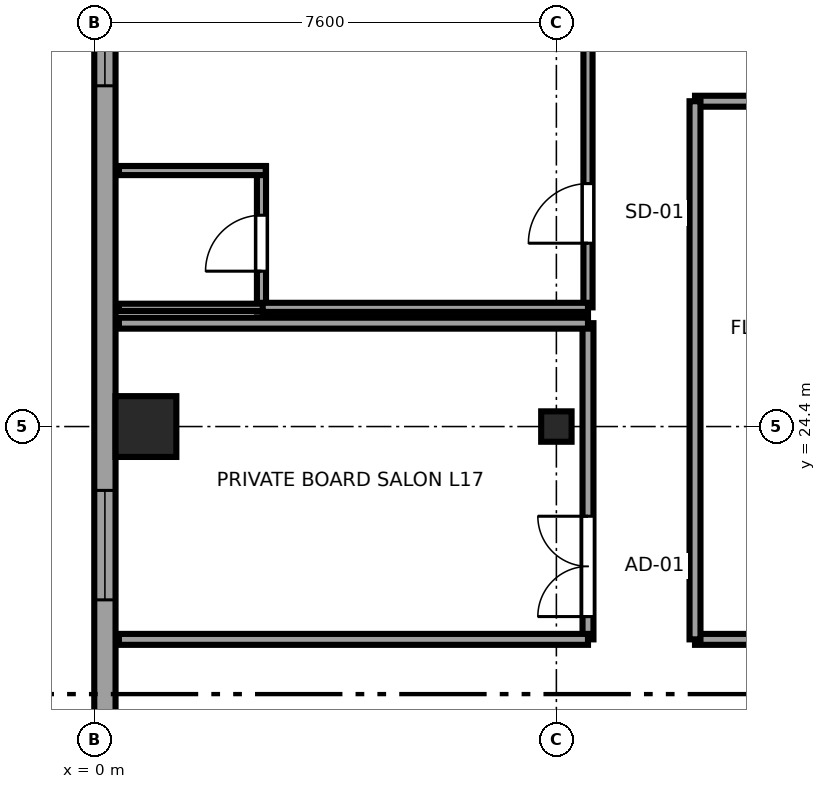
"""IFC4 building model, lengths in metres.
Left out: names, types, materials, properties, quantities, classifications, styles, units other than length and angle.
Written with IfcOpenShell. Run it as: python <this file> out.ifc"""

import sys

from ifc_helpers import new_model, si_unit, direction, frame, frame_2d, origin, origin_2d, place, context, subcontext, project, spatial, rectangle, i_section, extrude, source, transform, mapped, element, fill, save


model = new_model("IFC4")
c1 = context("Model", 3, precision=1e-05, world=origin(), true_north=direction((0.0, 1.0)))
c2 = subcontext(c1, "Body", "Model", "MODEL_VIEW")
j1 = project(units=[si_unit("LENGTHUNIT", "METRE"), si_unit("PLANEANGLEUNIT", "RADIAN")], contexts=[c1])
p1 = place(None, origin())
s1 = spatial("IfcSite", under=j1, at=p1, CompositionType="ELEMENT")
p2 = place(p1, origin())
s2 = spatial("IfcBuilding", under=s1, at=p2, CompositionType="ELEMENT")
p3 = place(p2, frame((0.0, 0.0, 71.05)))
s3 = spatial("IfcBuildingStorey", under=s2, at=p3, CompositionType="ELEMENT", Elevation=71.05)
m1 = source(origin(), c2, "Body", "SweptSolid", [
    extrude(rectangle(XDim=1.0, YDim=1.0, at=origin_2d()), origin(), (0.0, 0.0, 1.0), 3.55),
])
p4 = place(p3, frame((0.85, 24.4, 0.0), z_axis=(0.0, 0.0, 1.0), x_axis=(1.0, 0.0, 0.0)))
e1 = element("IfcColumn", 1, at=p4, inside=s3, PredefinedType="COLUMN", context=c2, shape_type="MappedRepresentation", body=[
    mapped(m1, transform((0.0, 0.0, 0.0), x_axis=(1.0, 0.0, 0.0), y_axis=(0.0, 1.0, 0.0), z_axis=(0.0, 0.0, 1.0), scale=1.0)),
])
m2 = source(origin(), c2, "Body", "SweptSolid", [
    extrude(i_section(OverallWidth=0.5, OverallDepth=0.5, WebThickness=0.028, FlangeThickness=0.045, at=origin_2d()), origin(), (0.0, 0.0, 1.0), 3.55),
])
p5 = place(p3, frame((7.6, 24.4, 0.0), z_axis=(0.0, 0.0, 1.0), x_axis=(1.0, 0.0, 0.0)))
e2 = element("IfcColumn", 2, at=p5, inside=s3, PredefinedType="COLUMN", context=c2, shape_type="MappedRepresentation", body=[
    mapped(m2, transform((0.0, 0.0, 0.0), x_axis=(1.0, 0.0, 0.0), y_axis=(0.0, 1.0, 0.0), z_axis=(0.0, 0.0, 1.0), scale=1.0)),
])
p6 = place(p3, frame((0.175, 41.383, 0.0), z_axis=(0.0, 0.0, 1.0), x_axis=(0.0, -1.0, 0.0)))
e3 = element("IfcWall", 3, at=p6, inside=s3, PredefinedType="SOLIDWALL", context=c2, shape_type="SweptSolid", body=[
    extrude(rectangle(XDim=36.766, YDim=0.35, at=frame_2d((18.383, 0.0))), origin(), (0.0, 0.0, 1.0), 3.37),
])
p7 = place(p6, frame((1.676, 0.0, 0.68)))
e4 = element("IfcOpeningElement", 4, at=p7, cuts=e3, PredefinedType="OPENING", context=c2, shape_type="SweptSolid", body=[
    extrude(rectangle(XDim=1.8, YDim=1.85, at=frame_2d((0.9, 0.925))), frame((0.0, 0.185, 0.0), z_axis=(0.0, -1.0, 0.0), x_axis=(1.0, 0.0, 0.0)), (0.0, 0.0, 1.0), 0.37),
])
p8 = place(p6, frame((4.578, 0.0, 0.68)))
e5 = element("IfcOpeningElement", 5, at=p8, cuts=e3, PredefinedType="OPENING", context=c2, shape_type="SweptSolid", body=[
    extrude(rectangle(XDim=1.8, YDim=1.85, at=frame_2d((0.9, 0.925))), frame((0.0, 0.185, 0.0), z_axis=(0.0, -1.0, 0.0), x_axis=(1.0, 0.0, 0.0)), (0.0, 0.0, 1.0), 0.37),
])
p9 = place(p6, frame((9.579, 0.0, 0.68)))
e6 = element("IfcOpeningElement", 6, at=p9, cuts=e3, PredefinedType="OPENING", context=c2, shape_type="SweptSolid", body=[
    extrude(rectangle(XDim=1.8, YDim=1.85, at=frame_2d((0.9, 0.925))), frame((0.0, 0.185, 0.0), z_axis=(0.0, -1.0, 0.0), x_axis=(1.0, 0.0, 0.0)), (0.0, 0.0, 1.0), 0.37),
])
p10 = place(p6, frame((18.033, 0.0, 0.68)))
e7 = element("IfcOpeningElement", 7, at=p10, cuts=e3, PredefinedType="OPENING", context=c2, shape_type="SweptSolid", body=[
    extrude(rectangle(XDim=1.8, YDim=1.85, at=frame_2d((0.9, 0.925))), frame((0.0, 0.185, 0.0), z_axis=(0.0, -1.0, 0.0), x_axis=(1.0, 0.0, 0.0)), (0.0, 0.0, 1.0), 0.37),
])
p11 = place(p6, frame((26.436, 0.0, 0.68)))
e8 = element("IfcOpeningElement", 8, at=p11, cuts=e3, PredefinedType="OPENING", context=c2, shape_type="SweptSolid", body=[
    extrude(rectangle(XDim=1.8, YDim=1.85, at=frame_2d((0.9, 0.925))), frame((0.0, 0.185, 0.0), z_axis=(0.0, -1.0, 0.0), x_axis=(1.0, 0.0, 0.0)), (0.0, 0.0, 1.0), 0.37),
])
p12 = place(p6, frame((29.338, 0.0, 0.68)))
e9 = element("IfcOpeningElement", 9, at=p12, cuts=e3, PredefinedType="OPENING", context=c2, shape_type="SweptSolid", body=[
    extrude(rectangle(XDim=1.8, YDim=1.85, at=frame_2d((0.9, 0.925))), frame((0.0, 0.185, 0.0), z_axis=(0.0, -1.0, 0.0), x_axis=(1.0, 0.0, 0.0)), (0.0, 0.0, 1.0), 0.37),
])
p13 = place(p6, frame((34.34, 0.0, 0.68)))
e10 = element("IfcOpeningElement", 10, at=p13, cuts=e3, PredefinedType="OPENING", context=c2, shape_type="SweptSolid", body=[
    extrude(rectangle(XDim=1.8, YDim=1.85, at=frame_2d((0.9, 0.925))), frame((0.0, 0.185, 0.0), z_axis=(0.0, -1.0, 0.0), x_axis=(1.0, 0.0, 0.0)), (0.0, 0.0, 1.0), 0.37),
])
p14 = place(p3, frame((2.75, 26.29, 0.0), z_axis=(0.0, 0.0, 1.0), x_axis=(0.0, 1.0, 0.0)))
e11 = element("IfcWall", 11, at=p14, inside=s3, PredefinedType="PARTITIONING", context=c2, shape_type="SweptSolid", body=[
    extrude(rectangle(XDim=2.39, YDim=0.15, at=frame_2d((1.195, 0.0))), origin(), (0.0, 0.0, 1.0), 3.37),
])
p15 = place(p14, frame((0.665, 0.0, 0.0)))
e12 = element("IfcOpeningElement", 12, at=p15, cuts=e11, PredefinedType="OPENING", context=c2, shape_type="SweptSolid", body=[
    extrude(rectangle(XDim=0.92, YDim=2.01, at=frame_2d((0.46, 1.005))), frame((0.0, 0.085, 0.0), z_axis=(0.0, -1.0, 0.0), x_axis=(1.0, 0.0, 0.0)), (0.0, 0.0, 1.0), 0.17),
])
p16 = place(p3, frame((0.405, 26.36, 0.0), z_axis=(0.0, 0.0, 1.0), x_axis=(1.0, 0.0, 0.0)))
e13 = element("IfcWall", 13, at=p16, inside=s3, PredefinedType="PLUMBINGWALL", context=c2, shape_type="SweptSolid", body=[
    extrude(rectangle(XDim=2.415, YDim=0.12, at=frame_2d((1.208, 0.0))), origin(), (0.0, 0.0, 1.0), 3.37),
])
p17 = place(p3, frame((0.405, 28.61, 0.0), z_axis=(0.0, 0.0, 1.0), x_axis=(1.0, 0.0, 0.0)))
e14 = element("IfcWall", 14, at=p17, inside=s3, PredefinedType="PARTITIONING", context=c2, shape_type="SweptSolid", body=[
    extrude(rectangle(XDim=2.415, YDim=0.15, at=frame_2d((1.208, 0.0))), origin(), (0.0, 0.0, 1.0), 3.37),
])
p18 = place(p3, frame((8.12, 20.9, 0.0), z_axis=(0.0, 0.0, 1.0), x_axis=(0.0, 1.0, 0.0)))
e15 = element("IfcWall", 15, at=p18, inside=s3, PredefinedType="PARTITIONING", context=c2, shape_type="SweptSolid", body=[
    extrude(rectangle(XDim=5.2, YDim=0.18, at=frame_2d((2.6, 0.0))), origin(), (0.0, 0.0, 1.0), 3.37),
])
p19 = place(p18, frame((0.375, 0.0, 0.0)))
e16 = element("IfcOpeningElement", 16, at=p19, cuts=e15, PredefinedType="OPENING", context=c2, shape_type="SweptSolid", body=[
    extrude(rectangle(XDim=1.65, YDim=2.15, at=frame_2d((0.825, 1.075))), frame((0.0, 0.1, 0.0), z_axis=(0.0, -1.0, 0.0), x_axis=(1.0, 0.0, 0.0)), (0.0, 0.0, 1.0), 0.2),
])
for number, where, z_axis, x_axis in (
    (17, (0.405, 20.9, 0.0), (0.0, 0.0, 1.0), (1.0, 0.0, 0.0)),
    (18, (0.405, 26.1, 0.0), (0.0, 0.0, 1.0), (1.0, 0.0, 0.0)),
):
    element("IfcWall", number, at=place(p3, frame(where, z_axis=z_axis, x_axis=x_axis)), inside=s3, PredefinedType="PARTITIONING", context=c2, shape_type="SweptSolid", body=[
        extrude(rectangle(XDim=7.715, YDim=0.18, at=frame_2d((3.857, 0.0))), origin(), (0.0, 0.0, 1.0), 3.37),
    ])
p20 = place(p3, frame((8.12, 26.36, 0.0), z_axis=(0.0, 0.0, 1.0), x_axis=(0.0, 1.0, 0.0)))
e19 = element("IfcWall", 19, at=p20, inside=s3, PredefinedType="PARTITIONING", context=c2, shape_type="SweptSolid", body=[
    extrude(rectangle(XDim=19.235, YDim=0.15, at=frame_2d((9.617, 0.0))), origin(), (0.0, 0.0, 1.0), 3.37),
])
p21 = place(p20, frame((1.055, 0.0, 0.0)))
e20 = element("IfcOpeningElement", 20, at=p21, cuts=e19, PredefinedType="OPENING", context=c2, shape_type="SweptSolid", body=[
    extrude(rectangle(XDim=0.98, YDim=2.12, at=frame_2d((0.49, 1.06))), frame((0.0, 0.085, 0.0), z_axis=(0.0, -1.0, 0.0), x_axis=(1.0, 0.0, 0.0)), (0.0, 0.0, 1.0), 0.17),
])
p22 = place(p3, frame((2.77, 26.36, 0.0), z_axis=(0.0, 0.0, 1.0), x_axis=(1.0, 0.0, 0.0)))
e21 = element("IfcWall", 21, at=p22, inside=s3, PredefinedType="PARTITIONING", context=c2, shape_type="SweptSolid", body=[
    extrude(rectangle(XDim=5.35, YDim=0.15, at=frame_2d((2.675, 0.0))), origin(), (0.0, 0.0, 1.0), 3.37),
])
p23 = place(p3, frame((9.88, 20.9, 0.0), z_axis=(0.0, 0.0, 1.0), x_axis=(1.0, 0.0, 0.0)))
e22 = element("IfcWall", 22, at=p23, inside=s3, PredefinedType="PARTITIONING", context=c2, shape_type="SweptSolid", body=[
    extrude(rectangle(XDim=4.22, YDim=0.18, at=frame_2d((2.11, 0.0))), origin(), (0.0, 0.0, 1.0), 3.37),
])
p24 = place(p23, frame((1.285, 0.0, 0.0)))
e23 = element("IfcOpeningElement", 23, at=p24, cuts=e22, PredefinedType="OPENING", context=c2, shape_type="SweptSolid", body=[
    extrude(rectangle(XDim=1.65, YDim=2.15, at=frame_2d((0.825, 1.075))), frame((0.0, 0.1, 0.0), z_axis=(0.0, -1.0, 0.0), x_axis=(1.0, 0.0, 0.0)), (0.0, 0.0, 1.0), 0.2),
])
p25 = place(p3, frame((9.88, 29.75, 0.0), z_axis=(0.0, 0.0, 1.0), x_axis=(1.0, 0.0, 0.0)))
e24 = element("IfcWall", 24, at=p25, inside=s3, PredefinedType="PARTITIONING", context=c2, shape_type="SweptSolid", body=[
    extrude(rectangle(XDim=4.22, YDim=0.18, at=frame_2d((2.11, 0.0))), origin(), (0.0, 0.0, 1.0), 3.37),
])
p26 = place(p3, frame((9.88, 20.9, 0.0), z_axis=(0.0, 0.0, 1.0), x_axis=(0.0, 1.0, 0.0)))
e25 = element("IfcWall", 25, at=p26, inside=s3, PredefinedType="PARTITIONING", context=c2, shape_type="SweptSolid", body=[
    extrude(rectangle(XDim=8.85, YDim=0.18, at=frame_2d((4.425, 0.0))), origin(), (0.0, 0.0, 1.0), 3.37),
])
m3 = source(origin(), c2, "Body", "SweptSolid", [
    extrude(rectangle(XDim=1.8, YDim=1.85, at=frame_2d((0.9, 0.925))), frame((0.0, 0.09, 0.0), z_axis=(0.0, -1.0, 0.0), x_axis=(1.0, 0.0, 0.0)), (0.0, 0.0, 1.0), 0.06),
])
p27 = place(p9, origin())
e26 = element("IfcWindow", 26, at=p27, inside=s3, PartitioningType="TRIPLE_PANEL_HORIZONTAL", PredefinedType="WINDOW", context=c2, shape_type="MappedRepresentation", body=[
    mapped(m3, transform((0.0, 0.0, 0.0), x_axis=(1.0, 0.0, 0.0), y_axis=(0.0, 1.0, 0.0), z_axis=(0.0, 0.0, 1.0), scale=1.0)),
])
fill(e6, e26)
p28 = place(p10, origin())
e27 = element("IfcWindow", 27, at=p28, inside=s3, PartitioningType="TRIPLE_PANEL_HORIZONTAL", PredefinedType="WINDOW", context=c2, shape_type="MappedRepresentation", body=[
    mapped(m3, transform((0.0, 0.0, 0.0), x_axis=(1.0, 0.0, 0.0), y_axis=(0.0, 1.0, 0.0), z_axis=(0.0, 0.0, 1.0), scale=1.0)),
])
fill(e7, e27)
m4 = source(origin(), c2, "Body", "SweptSolid", [
    extrude(rectangle(XDim=0.92, YDim=2.01, at=frame_2d((0.46, 1.005))), frame((0.0, 0.025, 0.0), z_axis=(0.0, -1.0, 0.0), x_axis=(1.0, 0.0, 0.0)), (0.0, 0.0, 1.0), 0.05),
])
p29 = place(p15, origin())
e28 = element("IfcDoor", 28, at=p29, inside=s3, OperationType="SINGLE_SWING_LEFT", PredefinedType="DOOR", context=c2, shape_type="MappedRepresentation", body=[
    mapped(m4, transform((0.0, 0.0, 0.0), x_axis=(1.0, 0.0, 0.0), y_axis=(0.0, 1.0, 0.0), z_axis=(0.0, 0.0, 1.0), scale=1.0)),
])
fill(e12, e28)
m5 = source(origin(), c2, "Body", "SweptSolid", [
    extrude(rectangle(XDim=1.65, YDim=2.15, at=frame_2d((0.825, 1.075))), frame((0.0, 0.025, 0.0), z_axis=(0.0, -1.0, 0.0), x_axis=(1.0, 0.0, 0.0)), (0.0, 0.0, 1.0), 0.05),
])
p30 = place(p19, origin())
e29 = element("IfcDoor", 29, at=p30, inside=s3, OperationType="DOUBLE_DOOR_SINGLE_SWING", PredefinedType="DOOR", context=c2, shape_type="MappedRepresentation", body=[
    mapped(m5, transform((0.0, 0.0, 0.0), x_axis=(1.0, 0.0, 0.0), y_axis=(0.0, 1.0, 0.0), z_axis=(0.0, 0.0, 1.0), scale=1.0)),
])
fill(e16, e29)
m6 = source(origin(), c2, "Body", "SweptSolid", [
    extrude(rectangle(XDim=0.98, YDim=2.12, at=frame_2d((0.49, 1.06))), frame((0.0, 0.025, 0.0), z_axis=(0.0, -1.0, 0.0), x_axis=(1.0, 0.0, 0.0)), (0.0, 0.0, 1.0), 0.05),
])
p31 = place(p21, origin())
e30 = element("IfcDoor", 30, at=p31, inside=s3, OperationType="SINGLE_SWING_LEFT", PredefinedType="DOOR", context=c2, shape_type="MappedRepresentation", body=[
    mapped(m6, transform((0.0, 0.0, 0.0), x_axis=(1.0, 0.0, 0.0), y_axis=(0.0, 1.0, 0.0), z_axis=(0.0, 0.0, 1.0), scale=1.0)),
])
fill(e20, e30)
save(model, sys.argv[1])
